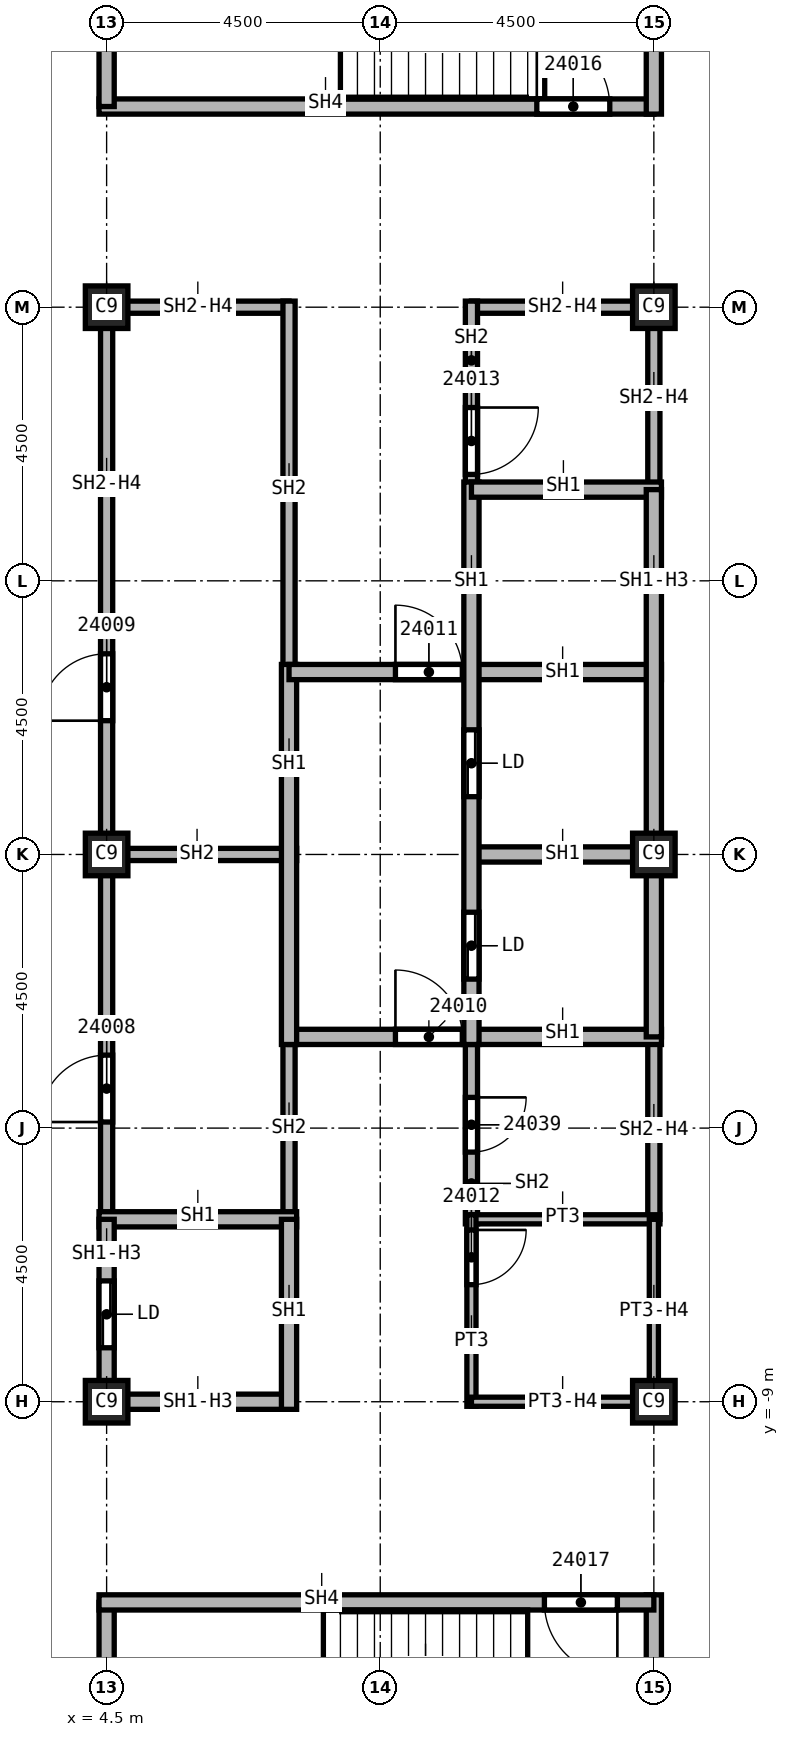
"""IFC4 building model, lengths in metres.
Left out: names, types, materials, properties, quantities, classifications, styles, units other than length and angle.
Written with IfcOpenShell. Run it as: python <this file> out.ifc"""

import sys

from ifc_helpers import new_model, si_unit, direction, frame, frame_2d, origin, origin_2d, place, context, subcontext, project, spatial, rectangle, extrude, element, fill, save


model = new_model("IFC4")
c1 = context("Model", 3, precision=1e-05, world=origin(), true_north=direction((0.0, 1.0)))
c2 = subcontext(c1, "Body", "Model", "MODEL_VIEW")
j1 = project(units=[si_unit("LENGTHUNIT", "METRE"), si_unit("PLANEANGLEUNIT", "RADIAN")], contexts=[c1])
p1 = place(None, origin())
s1 = spatial("IfcSite", under=j1, at=p1, CompositionType="ELEMENT")
p2 = place(p1, origin())
s2 = spatial("IfcBuilding", under=s1, at=p2, CompositionType="ELEMENT")
p3 = place(p2, frame((0.0, 0.0, 342.0)))
s3 = spatial("IfcBuildingStorey", under=s2, at=p3, CompositionType="ELEMENT", Elevation=342.0)
for number, where, z_axis, x_axis in (
    (1, (4.5, 0.0, 0.0), (0.0, 0.0, 1.0), (1.0, 0.0, 0.0)),
    (2, (4.5, 9.0, 0.0), (0.0, 0.0, 1.0), (1.0, 0.0, 0.0)),
    (3, (4.5, -9.0, 0.0), (0.0, 0.0, 1.0), (1.0, 0.0, 0.0)),
    (4, (13.5, 0.0, 0.0), (0.0, 0.0, 1.0), (1.0, 0.0, 0.0)),
    (5, (13.5, 9.0, 0.0), (0.0, 0.0, 1.0), (1.0, 0.0, 0.0)),
    (6, (13.5, -9.0, 0.0), (0.0, 0.0, 1.0), (1.0, 0.0, 0.0)),
):
    element("IfcColumn", number, at=place(p3, frame(where, z_axis=z_axis, x_axis=x_axis)), inside=s3, PredefinedType="COLUMN", context=c2, shape_type="SweptSolid", body=[
        extrude(rectangle(XDim=0.7, YDim=0.7, at=origin_2d()), origin(), (0.0, 0.0, 1.0), 3.74),
    ])
p4 = place(p3, frame((4.4, 0.0, 0.0), z_axis=(0.0, 0.0, 1.0), x_axis=(1.0, 0.0, 0.0)))
e7 = element("IfcWall", 7, at=p4, inside=s3, PredefinedType="SOLIDWALL", context=c2, shape_type="SweptSolid", body=[
    extrude(rectangle(XDim=3.225, YDim=0.2, at=frame_2d((1.613, 0.0))), origin(), (0.0, 0.0, 1.0), 3.74),
])
p5 = place(p3, frame((4.5, -6.0, 0.0), z_axis=(0.0, 0.0, 1.0), x_axis=(0.0, 1.0, 0.0)))
e8 = element("IfcWall", 8, at=p5, inside=s3, PredefinedType="SOLIDWALL", context=c2, shape_type="SweptSolid", body=[
    extrude(rectangle(XDim=15.1, YDim=0.2, at=frame_2d((7.55, 0.0))), origin(), (0.0, 0.0, 1.0), 3.062),
])
p6 = place(p5, frame((1.6, 0.0, 0.0)))
e9 = element("IfcOpeningElement", 9, at=p6, cuts=e8, PredefinedType="OPENING", context=c2, shape_type="SweptSolid", body=[
    extrude(rectangle(XDim=1.1, YDim=2.1, at=frame_2d((0.55, 1.05))), frame((0.0, 0.1, 0.0), z_axis=(0.0, -1.0, 0.0), x_axis=(1.0, 0.0, 0.0)), (0.0, 0.0, 1.0), 0.2),
])
p7 = place(p5, frame((8.2, 0.0, 0.0)))
e10 = element("IfcOpeningElement", 10, at=p7, cuts=e8, PredefinedType="OPENING", context=c2, shape_type="SweptSolid", body=[
    extrude(rectangle(XDim=1.1, YDim=2.1, at=frame_2d((0.55, 1.05))), frame((0.0, 0.1, 0.0), z_axis=(0.0, -1.0, 0.0), x_axis=(1.0, 0.0, 0.0)), (0.0, 0.0, 1.0), 0.2),
])
p8 = place(p3, frame((4.5, 9.0, 0.0), z_axis=(0.0, 0.0, 1.0), x_axis=(1.0, 0.0, 0.0)))
e11 = element("IfcWall", 11, at=p8, inside=s3, PredefinedType="SOLIDWALL", context=c2, shape_type="SweptSolid", body=[
    extrude(rectangle(XDim=3.0, YDim=0.2, at=frame_2d((1.5, 0.0))), origin(), (0.0, 0.0, 1.0), 3.062),
])
p9 = place(p3, frame((7.5, -2.875, 0.0), z_axis=(0.0, 0.0, 1.0), x_axis=(0.0, -1.0, 0.0)))
e12 = element("IfcWall", 12, at=p9, inside=s3, PredefinedType="SOLIDWALL", context=c2, shape_type="SweptSolid", body=[
    extrude(rectangle(XDim=3.125, YDim=0.2, at=frame_2d((1.562, 0.0))), origin(), (0.0, 0.0, 1.0), 3.74),
])
p10 = place(p3, frame((7.5, 9.1, 0.0), z_axis=(0.0, 0.0, 1.0), x_axis=(0.0, -1.0, 0.0)))
e13 = element("IfcWall", 13, at=p10, inside=s3, PredefinedType="SOLIDWALL", context=c2, shape_type="SweptSolid", body=[
    extrude(rectangle(XDim=6.225, YDim=0.2, at=frame_2d((3.113, 0.0))), origin(), (0.0, 0.0, 1.0), 3.74),
])
p11 = place(p3, frame((10.5, -2.875, 0.0), z_axis=(0.0, 0.0, 1.0), x_axis=(0.0, -1.0, 0.0)))
e14 = element("IfcWall", 14, at=p11, inside=s3, PredefinedType="SOLIDWALL", context=c2, shape_type="SweptSolid", body=[
    extrude(rectangle(XDim=3.2, YDim=0.2, at=frame_2d((1.6, 0.0))), origin(), (0.0, 0.0, 1.0), 3.74),
])
p12 = place(p11, frame((1.12, 0.0, 0.0)))
e15 = element("IfcOpeningElement", 15, at=p12, cuts=e14, PredefinedType="OPENING", context=c2, shape_type="SweptSolid", body=[
    extrude(rectangle(XDim=0.9, YDim=2.1, at=frame_2d((0.45, 1.05))), frame((0.0, 0.1, 0.0), z_axis=(0.0, -1.0, 0.0), x_axis=(1.0, 0.0, 0.0)), (0.0, 0.0, 1.0), 0.2),
])
p13 = place(p3, frame((10.5, 9.0, 0.0), z_axis=(0.0, 0.0, 1.0), x_axis=(1.0, 0.0, 0.0)))
e16 = element("IfcWall", 16, at=p13, inside=s3, PredefinedType="SOLIDWALL", context=c2, shape_type="SweptSolid", body=[
    extrude(rectangle(XDim=3.0, YDim=0.2, at=frame_2d((1.5, 0.0))), origin(), (0.0, 0.0, 1.0), 3.062),
])
p14 = place(p3, frame((10.5, 9.1, 0.0), z_axis=(0.0, 0.0, 1.0), x_axis=(0.0, -1.0, 0.0)))
e17 = element("IfcWall", 17, at=p14, inside=s3, PredefinedType="SOLIDWALL", context=c2, shape_type="SweptSolid", body=[
    extrude(rectangle(XDim=3.225, YDim=0.2, at=frame_2d((1.613, 0.0))), origin(), (0.0, 0.0, 1.0), 3.74),
])
p15 = place(p14, frame((1.75, 0.0, 0.0)))
e18 = element("IfcOpeningElement", 18, at=p15, cuts=e17, PredefinedType="OPENING", context=c2, shape_type="SweptSolid", body=[
    extrude(rectangle(XDim=1.1, YDim=2.1, at=frame_2d((0.55, 1.05))), frame((0.0, 0.1, 0.0), z_axis=(0.0, -1.0, 0.0), x_axis=(1.0, 0.0, 0.0)), (0.0, 0.0, 1.0), 0.2),
])
p16 = place(p3, frame((13.5, -3.0, 0.0), z_axis=(0.0, 0.0, 1.0), x_axis=(0.0, -1.0, 0.0)))
e19 = element("IfcWall", 19, at=p16, inside=s3, PredefinedType="SOLIDWALL", context=c2, shape_type="SweptSolid", body=[
    extrude(rectangle(XDim=3.0, YDim=0.2, at=frame_2d((1.5, 0.0))), origin(), (0.0, 0.0, 1.0), 3.062),
])
p17 = place(p3, frame((13.5, 9.1, 0.0), z_axis=(0.0, 0.0, 1.0), x_axis=(0.0, -1.0, 0.0)))
e20 = element("IfcWall", 20, at=p17, inside=s3, PredefinedType="SOLIDWALL", context=c2, shape_type="SweptSolid", body=[
    extrude(rectangle(XDim=3.1, YDim=0.2, at=frame_2d((1.55, 0.0))), origin(), (0.0, 0.0, 1.0), 3.062),
])
p18 = place(p3, frame((4.375, -6.0, 0.0), z_axis=(0.0, 0.0, 1.0), x_axis=(1.0, 0.0, 0.0)))
e21 = element("IfcWall", 21, at=p18, inside=s3, PredefinedType="SOLIDWALL", context=c2, shape_type="SweptSolid", body=[
    extrude(rectangle(XDim=3.25, YDim=0.25, at=frame_2d((1.625, 0.0))), origin(), (0.0, 0.0, 1.0), 3.74),
])
p19 = place(p3, frame((4.5, -9.125, 0.0), z_axis=(0.0, 0.0, 1.0), x_axis=(0.0, 1.0, 0.0)))
e22 = element("IfcWall", 22, at=p19, inside=s3, PredefinedType="SOLIDWALL", context=c2, shape_type="SweptSolid", body=[
    extrude(rectangle(XDim=3.125, YDim=0.25, at=frame_2d((1.562, 0.0))), origin(), (0.0, 0.0, 1.0), 3.062),
])
p20 = place(p19, frame((1.012, 0.0, 0.0)))
e23 = element("IfcOpeningElement", 23, at=p20, cuts=e22, PredefinedType="OPENING", context=c2, shape_type="SweptSolid", body=[
    extrude(rectangle(XDim=1.1, YDim=2.1, at=frame_2d((0.55, 1.05))), frame((0.0, 0.125, 0.0), z_axis=(0.0, -1.0, 0.0), x_axis=(1.0, 0.0, 0.0)), (0.0, 0.0, 1.0), 0.25),
])
p21 = place(p3, frame((7.5, -9.0, 0.0), z_axis=(0.0, 0.0, 1.0), x_axis=(-1.0, 0.0, 0.0)))
e24 = element("IfcWall", 24, at=p21, inside=s3, PredefinedType="SOLIDWALL", context=c2, shape_type="SweptSolid", body=[
    extrude(rectangle(XDim=3.0, YDim=0.25, at=frame_2d((1.5, 0.0))), origin(), (0.0, 0.0, 1.0), 3.062),
])
p22 = place(p3, frame((7.5, -6.0, 0.0), z_axis=(0.0, 0.0, 1.0), x_axis=(0.0, -1.0, 0.0)))
e25 = element("IfcWall", 25, at=p22, inside=s3, PredefinedType="SOLIDWALL", context=c2, shape_type="SweptSolid", body=[
    extrude(rectangle(XDim=3.125, YDim=0.25, at=frame_2d((1.562, 0.0))), origin(), (0.0, 0.0, 1.0), 3.74),
])
p23 = place(p3, frame((7.5, -3.0, 0.0), z_axis=(0.0, 0.0, 1.0), x_axis=(1.0, 0.0, 0.0)))
e26 = element("IfcWall", 26, at=p23, inside=s3, PredefinedType="SOLIDWALL", context=c2, shape_type="SweptSolid", body=[
    extrude(rectangle(XDim=6.125, YDim=0.25, at=frame_2d((3.062, 0.0))), origin(), (0.0, 0.0, 1.0), 3.74),
])
p24 = place(p23, frame((1.75, 0.0, 0.0)))
e27 = element("IfcOpeningElement", 27, at=p24, cuts=e26, PredefinedType="OPENING", context=c2, shape_type="SweptSolid", body=[
    extrude(rectangle(XDim=1.1, YDim=2.1, at=frame_2d((0.55, 1.05))), frame((0.0, 0.125, 0.0), z_axis=(0.0, -1.0, 0.0), x_axis=(1.0, 0.0, 0.0)), (0.0, 0.0, 1.0), 0.25),
])
p25 = place(p3, frame((7.5, 3.125, 0.0), z_axis=(0.0, 0.0, 1.0), x_axis=(0.0, -1.0, 0.0)))
e28 = element("IfcWall", 28, at=p25, inside=s3, PredefinedType="SOLIDWALL", context=c2, shape_type="SweptSolid", body=[
    extrude(rectangle(XDim=6.25, YDim=0.25, at=frame_2d((3.125, 0.0))), origin(), (0.0, 0.0, 1.0), 3.74),
])
p26 = place(p3, frame((7.5, 3.0, 0.0), z_axis=(0.0, 0.0, 1.0), x_axis=(1.0, 0.0, 0.0)))
e29 = element("IfcWall", 29, at=p26, inside=s3, PredefinedType="SOLIDWALL", context=c2, shape_type="SweptSolid", body=[
    extrude(rectangle(XDim=6.125, YDim=0.25, at=frame_2d((3.062, 0.0))), origin(), (0.0, 0.0, 1.0), 3.74),
])
p27 = place(p26, frame((1.75, 0.0, 0.0)))
e30 = element("IfcOpeningElement", 30, at=p27, cuts=e29, PredefinedType="OPENING", context=c2, shape_type="SweptSolid", body=[
    extrude(rectangle(XDim=1.1, YDim=2.1, at=frame_2d((0.55, 1.05))), frame((0.0, 0.125, 0.0), z_axis=(0.0, -1.0, 0.0), x_axis=(1.0, 0.0, 0.0)), (0.0, 0.0, 1.0), 0.25),
])
p28 = place(p3, frame((10.5, 0.0, 0.0), z_axis=(0.0, 0.0, 1.0), x_axis=(1.0, 0.0, 0.0)))
e31 = element("IfcWall", 31, at=p28, inside=s3, PredefinedType="SOLIDWALL", context=c2, shape_type="SweptSolid", body=[
    extrude(rectangle(XDim=3.125, YDim=0.25, at=frame_2d((1.562, 0.0))), origin(), (0.0, 0.0, 1.0), 3.74),
])
p29 = place(p3, frame((10.5, 6.125, 0.0), z_axis=(0.0, 0.0, 1.0), x_axis=(0.0, -1.0, 0.0)))
e32 = element("IfcWall", 32, at=p29, inside=s3, PredefinedType="SOLIDWALL", context=c2, shape_type="SweptSolid", body=[
    extrude(rectangle(XDim=9.25, YDim=0.25, at=frame_2d((4.625, 0.0))), origin(), (0.0, 0.0, 1.0), 3.74),
])
p30 = place(p29, frame((7.075, 0.0, 0.0)))
e33 = element("IfcOpeningElement", 33, at=p30, cuts=e32, PredefinedType="OPENING", context=c2, shape_type="SweptSolid", body=[
    extrude(rectangle(XDim=1.1, YDim=2.1, at=frame_2d((0.55, 1.05))), frame((0.0, 0.125, 0.0), z_axis=(0.0, -1.0, 0.0), x_axis=(1.0, 0.0, 0.0)), (0.0, 0.0, 1.0), 0.25),
])
p31 = place(p29, frame((4.075, 0.0, 0.0)))
e34 = element("IfcOpeningElement", 34, at=p31, cuts=e32, PredefinedType="OPENING", context=c2, shape_type="SweptSolid", body=[
    extrude(rectangle(XDim=1.1, YDim=2.1, at=frame_2d((0.55, 1.05))), frame((0.0, 0.125, 0.0), z_axis=(0.0, -1.0, 0.0), x_axis=(1.0, 0.0, 0.0)), (0.0, 0.0, 1.0), 0.25),
])
p32 = place(p3, frame((10.5, 6.0, 0.0), z_axis=(0.0, 0.0, 1.0), x_axis=(1.0, 0.0, 0.0)))
e35 = element("IfcWall", 35, at=p32, inside=s3, PredefinedType="SOLIDWALL", context=c2, shape_type="SweptSolid", body=[
    extrude(rectangle(XDim=3.125, YDim=0.25, at=frame_2d((1.562, 0.0))), origin(), (0.0, 0.0, 1.0), 3.74),
])
p33 = place(p3, frame((13.5, 6.0, 0.0), z_axis=(0.0, 0.0, 1.0), x_axis=(0.0, -1.0, 0.0)))
e36 = element("IfcWall", 36, at=p33, inside=s3, PredefinedType="SOLIDWALL", context=c2, shape_type="SweptSolid", body=[
    extrude(rectangle(XDim=9.0, YDim=0.25, at=frame_2d((4.5, 0.0))), origin(), (0.0, 0.0, 1.0), 3.062),
])
p34 = place(p3, frame((4.375, 12.3, 0.0), z_axis=(0.0, 0.0, 1.0), x_axis=(1.0, 0.0, 0.0)))
e37 = element("IfcWall", 37, at=p34, inside=s3, PredefinedType="SOLIDWALL", context=c2, shape_type="SweptSolid", body=[
    extrude(rectangle(XDim=9.125, YDim=0.25, at=frame_2d((4.562, 0.0))), origin(), (0.0, 0.0, 1.0), 3.74),
])
p35 = place(p34, frame((7.2, 0.0, 0.0)))
e38 = element("IfcOpeningElement", 38, at=p35, cuts=e37, PredefinedType="OPENING", context=c2, shape_type="SweptSolid", body=[
    extrude(rectangle(XDim=1.2, YDim=2.1, at=frame_2d((0.6, 1.05))), frame((0.0, 0.125, 0.0), z_axis=(0.0, -1.0, 0.0), x_axis=(1.0, 0.0, 0.0)), (0.0, 0.0, 1.0), 0.25),
])
for number, where, z_axis, x_axis in (
    (39, (4.5, -16.8, 0.0), (0.0, 0.0, 1.0), (0.0, 1.0, 0.0)),
    (40, (4.5, 12.3, 0.0), (0.0, 0.0, 1.0), (0.0, 1.0, 0.0)),
):
    element("IfcWall", number, at=place(p3, frame(where, z_axis=z_axis, x_axis=x_axis)), inside=s3, PredefinedType="SOLIDWALL", context=c2, shape_type="SweptSolid", body=[
        extrude(rectangle(XDim=4.5, YDim=0.25, at=frame_2d((2.25, 0.0))), origin(), (0.0, 0.0, 1.0), 3.74),
    ])
p36 = place(p3, frame((13.5, -16.925, 0.0), z_axis=(0.0, 0.0, 1.0), x_axis=(0.0, 1.0, 0.0)))
e41 = element("IfcWall", 41, at=p36, inside=s3, PredefinedType="SOLIDWALL", context=c2, shape_type="SweptSolid", body=[
    extrude(rectangle(XDim=4.75, YDim=0.25, at=frame_2d((2.375, 0.0))), origin(), (0.0, 0.0, 1.0), 3.74),
])
p37 = place(p3, frame((13.5, -12.3, 0.0), z_axis=(0.0, 0.0, 1.0), x_axis=(-1.0, 0.0, 0.0)))
e42 = element("IfcWall", 42, at=p37, inside=s3, PredefinedType="SOLIDWALL", context=c2, shape_type="SweptSolid", body=[
    extrude(rectangle(XDim=9.125, YDim=0.25, at=frame_2d((4.562, 0.0))), origin(), (0.0, 0.0, 1.0), 3.74),
])
p38 = place(p37, frame((0.6, 0.0, 0.0)))
e43 = element("IfcOpeningElement", 43, at=p38, cuts=e42, PredefinedType="OPENING", context=c2, shape_type="SweptSolid", body=[
    extrude(rectangle(XDim=1.2, YDim=2.1, at=frame_2d((0.6, 1.05))), frame((0.0, 0.125, 0.0), z_axis=(0.0, -1.0, 0.0), x_axis=(1.0, 0.0, 0.0)), (0.0, 0.0, 1.0), 0.25),
])
p39 = place(p3, frame((13.5, 12.175, 0.0), z_axis=(0.0, 0.0, 1.0), x_axis=(0.0, 1.0, 0.0)))
e44 = element("IfcWall", 44, at=p39, inside=s3, PredefinedType="SOLIDWALL", context=c2, shape_type="SweptSolid", body=[
    extrude(rectangle(XDim=4.75, YDim=0.25, at=frame_2d((2.375, 0.0))), origin(), (0.0, 0.0, 1.0), 3.74),
])
p40 = place(p3, frame((10.5, -6.0, 0.0), z_axis=(0.0, 0.0, 1.0), x_axis=(1.0, 0.0, 0.0)))
e45 = element("IfcWall", 45, at=p40, inside=s3, PredefinedType="PARTITIONING", context=c2, shape_type="SweptSolid", body=[
    extrude(rectangle(XDim=3.1, YDim=0.15, at=frame_2d((1.55, 0.0))), origin(), (0.0, 0.0, 1.0), 3.74),
])
p41 = place(p3, frame((10.5, -5.925, 0.0), z_axis=(0.0, 0.0, 1.0), x_axis=(0.0, -1.0, 0.0)))
e46 = element("IfcWall", 46, at=p41, inside=s3, PredefinedType="PARTITIONING", context=c2, shape_type="SweptSolid", body=[
    extrude(rectangle(XDim=3.15, YDim=0.15, at=frame_2d((1.575, 0.0))), origin(), (0.0, 0.0, 1.0), 3.74),
])
p42 = place(p41, frame((0.25, 0.0, 0.0)))
e47 = element("IfcOpeningElement", 47, at=p42, cuts=e46, PredefinedType="OPENING", context=c2, shape_type="SweptSolid", body=[
    extrude(rectangle(XDim=0.9, YDim=2.1, at=frame_2d((0.45, 1.05))), frame((0.0, 0.075, 0.0), z_axis=(0.0, -1.0, 0.0), x_axis=(1.0, 0.0, 0.0)), (0.0, 0.0, 1.0), 0.15),
])
p43 = place(p3, frame((13.5, -9.0, 0.0), z_axis=(0.0, 0.0, 1.0), x_axis=(-1.0, 0.0, 0.0)))
e48 = element("IfcWall", 48, at=p43, inside=s3, PredefinedType="PARTITIONING", context=c2, shape_type="SweptSolid", body=[
    extrude(rectangle(XDim=3.0, YDim=0.15, at=frame_2d((1.5, 0.0))), origin(), (0.0, 0.0, 1.0), 3.062),
])
p44 = place(p3, frame((13.5, -6.0, 0.0), z_axis=(0.0, 0.0, 1.0), x_axis=(0.0, -1.0, 0.0)))
e49 = element("IfcWall", 49, at=p44, inside=s3, PredefinedType="PARTITIONING", context=c2, shape_type="SweptSolid", body=[
    extrude(rectangle(XDim=3.075, YDim=0.15, at=frame_2d((1.538, 0.0))), origin(), (0.0, 0.0, 1.0), 3.062),
])
p45 = place(p6, origin())
e50 = element("IfcDoor", 50, at=p45, inside=s3, OperationType="SINGLE_SWING_LEFT", PredefinedType="DOOR", context=c2, shape_type="SweptSolid", body=[
    extrude(rectangle(XDim=1.1, YDim=2.1, at=frame_2d((0.55, 1.05))), frame((0.0, 0.025, 0.0), z_axis=(0.0, -1.0, 0.0), x_axis=(1.0, 0.0, 0.0)), (0.0, 0.0, 1.0), 0.05),
])
fill(e9, e50)
p46 = place(p7, origin())
e51 = element("IfcDoor", 51, at=p46, inside=s3, OperationType="SINGLE_SWING_RIGHT", PredefinedType="DOOR", context=c2, shape_type="SweptSolid", body=[
    extrude(rectangle(XDim=1.1, YDim=2.1, at=frame_2d((0.55, 1.05))), frame((0.0, 0.025, 0.0), z_axis=(0.0, -1.0, 0.0), x_axis=(1.0, 0.0, 0.0)), (0.0, 0.0, 1.0), 0.05),
])
fill(e10, e51)
p47 = place(p24, origin())
e52 = element("IfcDoor", 52, at=p47, inside=s3, OperationType="SINGLE_SWING_LEFT", PredefinedType="DOOR", context=c2, shape_type="SweptSolid", body=[
    extrude(rectangle(XDim=1.1, YDim=2.1, at=frame_2d((0.55, 1.05))), frame((0.0, 0.025, 0.0), z_axis=(0.0, -1.0, 0.0), x_axis=(1.0, 0.0, 0.0)), (0.0, 0.0, 1.0), 0.05),
])
fill(e27, e52)
p48 = place(p27, origin())
e53 = element("IfcDoor", 53, at=p48, inside=s3, OperationType="SINGLE_SWING_RIGHT", PredefinedType="DOOR", context=c2, shape_type="SweptSolid", body=[
    extrude(rectangle(XDim=1.1, YDim=2.1, at=frame_2d((0.55, 1.05))), frame((0.0, 0.025, 0.0), z_axis=(0.0, -1.0, 0.0), x_axis=(1.0, 0.0, 0.0)), (0.0, 0.0, 1.0), 0.05),
])
fill(e30, e53)
p49 = place(p42, origin())
e54 = element("IfcDoor", 54, at=p49, inside=s3, OperationType="SINGLE_SWING_LEFT", PredefinedType="DOOR", context=c2, shape_type="SweptSolid", body=[
    extrude(rectangle(XDim=0.9, YDim=2.1, at=frame_2d((0.45, 1.05))), frame((0.0, 0.025, 0.0), z_axis=(0.0, -1.0, 0.0), x_axis=(1.0, 0.0, 0.0)), (0.0, 0.0, 1.0), 0.05),
])
fill(e47, e54)
p50 = place(p15, origin())
e55 = element("IfcDoor", 55, at=p50, inside=s3, OperationType="SINGLE_SWING_RIGHT", PredefinedType="DOOR", context=c2, shape_type="SweptSolid", body=[
    extrude(rectangle(XDim=1.1, YDim=2.1, at=frame_2d((0.55, 1.05))), frame((0.0, 0.025, 0.0), z_axis=(0.0, -1.0, 0.0), x_axis=(1.0, 0.0, 0.0)), (0.0, 0.0, 1.0), 0.05),
])
fill(e18, e55)
p51 = place(p35, origin())
e56 = element("IfcDoor", 56, at=p51, inside=s3, OperationType="SINGLE_SWING_LEFT", PredefinedType="DOOR", context=c2, shape_type="SweptSolid", body=[
    extrude(rectangle(XDim=1.2, YDim=2.1, at=frame_2d((0.6, 1.05))), frame((0.0, 0.025, 0.0), z_axis=(0.0, -1.0, 0.0), x_axis=(1.0, 0.0, 0.0)), (0.0, 0.0, 1.0), 0.05),
])
fill(e38, e56)
p52 = place(p38, origin())
e57 = element("IfcDoor", 57, at=p52, inside=s3, OperationType="SINGLE_SWING_RIGHT", PredefinedType="DOOR", context=c2, shape_type="SweptSolid", body=[
    extrude(rectangle(XDim=1.2, YDim=2.1, at=frame_2d((0.6, 1.05))), frame((0.0, 0.025, 0.0), z_axis=(0.0, -1.0, 0.0), x_axis=(1.0, 0.0, 0.0)), (0.0, 0.0, 1.0), 0.05),
])
fill(e43, e57)
p53 = place(p12, origin())
e58 = element("IfcDoor", 58, at=p53, inside=s3, OperationType="SINGLE_SWING_LEFT", PredefinedType="DOOR", context=c2, shape_type="SweptSolid", body=[
    extrude(rectangle(XDim=0.9, YDim=2.1, at=frame_2d((0.45, 1.05))), frame((0.0, 0.025, 0.0), z_axis=(0.0, -1.0, 0.0), x_axis=(1.0, 0.0, 0.0)), (0.0, 0.0, 1.0), 0.05),
])
fill(e15, e58)
p54 = place(p20, origin())
e59 = element("IfcDoor", 59, at=p54, inside=s3, OperationType="SLIDING_TO_LEFT", PredefinedType="DOOR", context=c2, shape_type="SweptSolid", body=[
    extrude(rectangle(XDim=1.1, YDim=2.1, at=frame_2d((0.55, 1.05))), frame((0.0, 0.025, 0.0), z_axis=(0.0, -1.0, 0.0), x_axis=(1.0, 0.0, 0.0)), (0.0, 0.0, 1.0), 0.05),
])
fill(e23, e59)
p55 = place(p30, origin())
e60 = element("IfcDoor", 60, at=p55, inside=s3, OperationType="SLIDING_TO_LEFT", PredefinedType="DOOR", context=c2, shape_type="SweptSolid", body=[
    extrude(rectangle(XDim=1.1, YDim=2.1, at=frame_2d((0.55, 1.05))), frame((0.0, 0.025, 0.0), z_axis=(0.0, -1.0, 0.0), x_axis=(1.0, 0.0, 0.0)), (0.0, 0.0, 1.0), 0.05),
])
fill(e33, e60)
p56 = place(p31, origin())
e61 = element("IfcDoor", 61, at=p56, inside=s3, OperationType="SLIDING_TO_LEFT", PredefinedType="DOOR", context=c2, shape_type="SweptSolid", body=[
    extrude(rectangle(XDim=1.1, YDim=2.1, at=frame_2d((0.55, 1.05))), frame((0.0, 0.025, 0.0), z_axis=(0.0, -1.0, 0.0), x_axis=(1.0, 0.0, 0.0)), (0.0, 0.0, 1.0), 0.05),
])
fill(e34, e61)
save(model, sys.argv[1])
